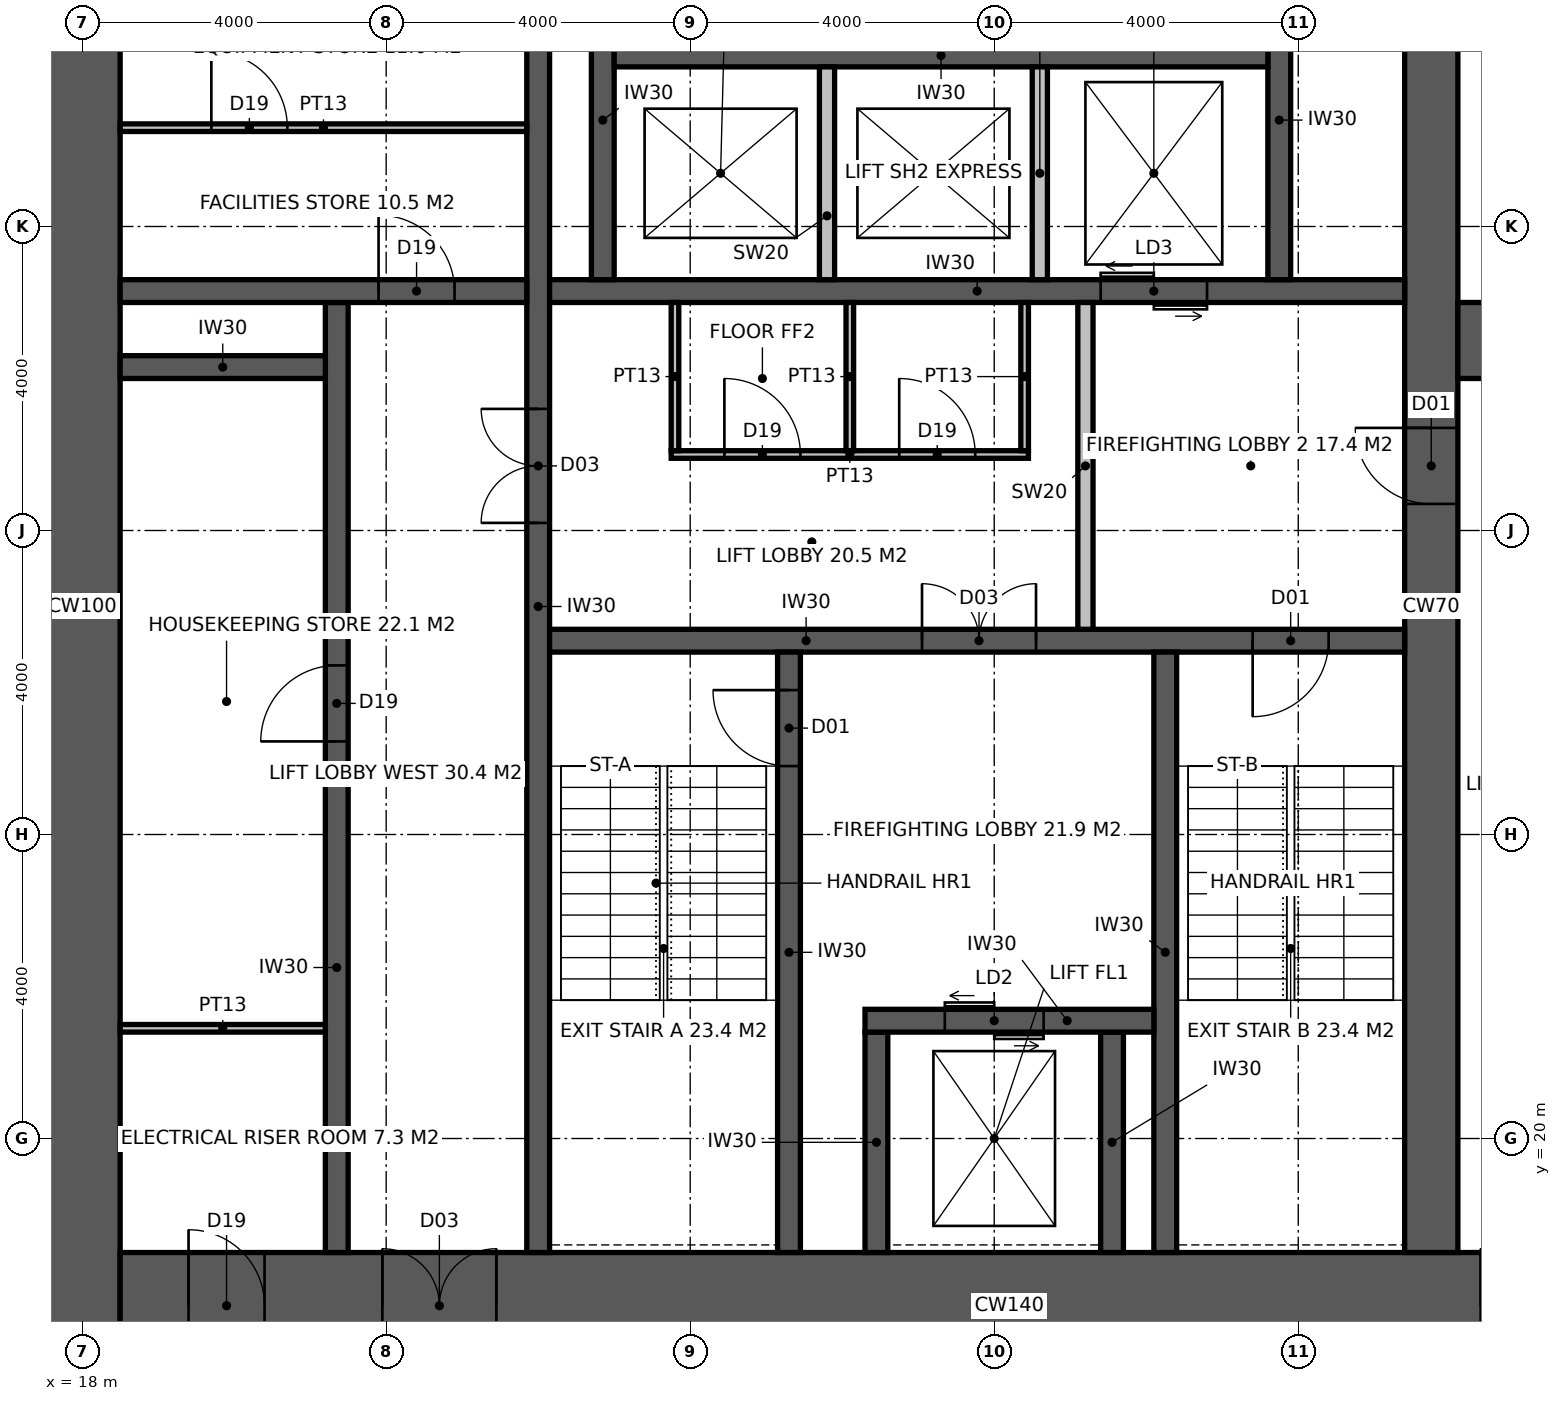
"""IFC4 building model, lengths in metres.
Left out: names, types, materials, properties, quantities, classifications, styles, units other than length and angle.
Written with IfcOpenShell. Run it as: python <this file> out.ifc"""

import sys

from ifc_helpers import new_model, si_unit, direction, frame, frame_2d, origin, place, context, subcontext, project, spatial, rectangle, extrude, element, fill, save


model = new_model("IFC4")
c1 = context("Model", 3, precision=1e-05, world=origin(), true_north=direction((0.0, 1.0)))
c2 = subcontext(c1, "Body", "Model", "MODEL_VIEW")
j1 = project(units=[si_unit("LENGTHUNIT", "METRE"), si_unit("PLANEANGLEUNIT", "RADIAN")], contexts=[c1])
p1 = place(None, origin())
s1 = spatial("IfcSite", under=j1, at=p1, CompositionType="ELEMENT")
p2 = place(p1, origin())
s2 = spatial("IfcBuilding", under=s1, at=p2, CompositionType="ELEMENT")
p3 = place(p2, frame((0.0, 0.0, 47.0)))
s3 = spatial("IfcBuildingStorey", under=s2, at=p3, CompositionType="ELEMENT", Elevation=47.0)
p4 = place(p3, frame((18.0, 17.1, -0.15), z_axis=(0.0, 0.0, 1.0), x_axis=(0.0, 1.0, 0.0)))
e1 = element("IfcWall", 1, at=p4, inside=s3, PredefinedType="SHEAR", context=c2, shape_type="SweptSolid", body=[
    extrude(rectangle(XDim=19.8, YDim=1.0, at=frame_2d((9.9, 0.0))), origin(), (0.0, 0.0, 1.0), 4.0),
])
p5 = place(p3, frame((18.5, 17.8, -0.15), z_axis=(0.0, 0.0, 1.0), x_axis=(1.0, 0.0, 0.0)))
e2 = element("IfcWall", 2, at=p5, inside=s3, PredefinedType="SHEAR", context=c2, shape_type="SweptSolid", body=[
    extrude(rectangle(XDim=23.4, YDim=1.4, at=frame_2d((11.7, 0.0))), origin(), (0.0, 0.0, 1.0), 4.0),
])
p6 = place(p5, frame((3.45, 0.0, 0.15)))
e3 = element("IfcOpeningElement", 3, at=p6, cuts=e2, PredefinedType="OPENING", context=c2, shape_type="SweptSolid", body=[
    extrude(rectangle(XDim=1.5, YDim=2.4, at=frame_2d((0.75, 1.2))), frame((0.0, 0.71, 0.0), z_axis=(0.0, -1.0, 0.0), x_axis=(1.0, 0.0, 0.0)), (0.0, 0.0, 1.0), 1.42),
])
p7 = place(p5, frame((17.9, 0.0, 0.15)))
e4 = element("IfcOpeningElement", 4, at=p7, cuts=e2, PredefinedType="OPENING", context=c2, shape_type="SweptSolid", body=[
    extrude(rectangle(XDim=1.5, YDim=2.4, at=frame_2d((0.75, 1.2))), frame((0.0, 0.71, 0.0), z_axis=(0.0, -1.0, 0.0), x_axis=(1.0, 0.0, 0.0)), (0.0, 0.0, 1.0), 1.42),
])
p8 = place(p5, frame((0.9, 0.0, 0.15)))
e5 = element("IfcOpeningElement", 5, at=p8, cuts=e2, PredefinedType="OPENING", context=c2, shape_type="SweptSolid", body=[
    extrude(rectangle(XDim=1.0, YDim=2.2, at=frame_2d((0.5, 1.1))), frame((0.0, 0.71, 0.0), z_axis=(0.0, -1.0, 0.0), x_axis=(1.0, 0.0, 0.0)), (0.0, 0.0, 1.0), 1.42),
])
p9 = place(p3, frame((35.75, 18.5, -0.15), z_axis=(0.0, 0.0, 1.0), x_axis=(0.0, 1.0, 0.0)))
e6 = element("IfcWall", 6, at=p9, inside=s3, PredefinedType="SHEAR", context=c2, shape_type="SweptSolid", body=[
    extrude(rectangle(XDim=17.0, YDim=0.7, at=frame_2d((8.5, 0.0))), origin(), (0.0, 0.0, 1.0), 4.0),
])
p10 = place(p9, frame((9.85, 0.0, 0.15)))
e7 = element("IfcOpeningElement", 7, at=p10, cuts=e6, PredefinedType="OPENING", context=c2, shape_type="SweptSolid", body=[
    extrude(rectangle(XDim=1.0, YDim=2.2, at=frame_2d((0.5, 1.1))), frame((0.0, 0.36, 0.0), z_axis=(0.0, -1.0, 0.0), x_axis=(1.0, 0.0, 0.0)), (0.0, 0.0, 1.0), 0.72),
])
p11 = place(p3, frame((24.0, 18.5, -0.15), z_axis=(0.0, 0.0, 1.0), x_axis=(0.0, 1.0, 0.0)))
e8 = element("IfcWall", 8, at=p11, inside=s3, PredefinedType="SHEAR", context=c2, shape_type="SweptSolid", body=[
    extrude(rectangle(XDim=17.0, YDim=0.3, at=frame_2d((8.5, 0.0))), origin(), (0.0, 0.0, 1.0), 4.0),
])
p12 = place(p11, frame((9.6, 0.0, 0.15)))
e9 = element("IfcOpeningElement", 9, at=p12, cuts=e8, PredefinedType="OPENING", context=c2, shape_type="SweptSolid", body=[
    extrude(rectangle(XDim=1.5, YDim=2.4, at=frame_2d((0.75, 1.2))), frame((0.0, 0.16, 0.0), z_axis=(0.0, -1.0, 0.0), x_axis=(1.0, 0.0, 0.0)), (0.0, 0.0, 1.0), 0.32),
])
p13 = place(p3, frame((24.15, 26.55, -0.15), z_axis=(0.0, 0.0, 1.0), x_axis=(1.0, 0.0, 0.0)))
e10 = element("IfcWall", 10, at=p13, inside=s3, PredefinedType="SHEAR", context=c2, shape_type="SweptSolid", body=[
    extrude(rectangle(XDim=11.25, YDim=0.3, at=frame_2d((5.625, 0.0))), origin(), (0.0, 0.0, 1.0), 4.0),
])
p14 = place(p13, frame((9.25, 0.0, 0.15)))
e11 = element("IfcOpeningElement", 11, at=p14, cuts=e10, PredefinedType="OPENING", context=c2, shape_type="SweptSolid", body=[
    extrude(rectangle(XDim=1.0, YDim=2.2, at=frame_2d((0.5, 1.1))), frame((0.0, 0.16, 0.0), z_axis=(0.0, -1.0, 0.0), x_axis=(1.0, 0.0, 0.0)), (0.0, 0.0, 1.0), 0.32),
])
p15 = place(p13, frame((4.9, 0.0, 0.15)))
e12 = element("IfcOpeningElement", 12, at=p15, cuts=e10, PredefinedType="OPENING", context=c2, shape_type="SweptSolid", body=[
    extrude(rectangle(XDim=1.5, YDim=2.4, at=frame_2d((0.75, 1.2))), frame((0.0, 0.16, 0.0), z_axis=(0.0, -1.0, 0.0), x_axis=(1.0, 0.0, 0.0)), (0.0, 0.0, 1.0), 0.32),
])
p16 = place(p3, frame((27.3, 18.5, -0.15), z_axis=(0.0, 0.0, 1.0), x_axis=(0.0, 1.0, 0.0)))
e13 = element("IfcWall", 13, at=p16, inside=s3, PredefinedType="SHEAR", context=c2, shape_type="SweptSolid", body=[
    extrude(rectangle(XDim=7.9, YDim=0.3, at=frame_2d((3.95, 0.0))), origin(), (0.0, 0.0, 1.0), 4.0),
])
p17 = place(p16, frame((6.4, 0.0, 0.15)))
e14 = element("IfcOpeningElement", 14, at=p17, cuts=e13, PredefinedType="OPENING", context=c2, shape_type="SweptSolid", body=[
    extrude(rectangle(XDim=1.0, YDim=2.2, at=frame_2d((0.5, 1.1))), frame((0.0, 0.16, 0.0), z_axis=(0.0, -1.0, 0.0), x_axis=(1.0, 0.0, 0.0)), (0.0, 0.0, 1.0), 0.32),
])
p18 = place(p3, frame((32.25, 18.5, -0.15), z_axis=(0.0, 0.0, 1.0), x_axis=(0.0, 1.0, 0.0)))
e15 = element("IfcWall", 15, at=p18, inside=s3, PredefinedType="SHEAR", context=c2, shape_type="SweptSolid", body=[
    extrude(rectangle(XDim=7.9, YDim=0.3, at=frame_2d((3.95, 0.0))), origin(), (0.0, 0.0, 1.0), 4.0),
])
for number, where, z_axis, x_axis in (
    (16, (28.45, 18.5, -0.15), (0.0, 0.0, 1.0), (0.0, 1.0, 0.0)),
    (17, (31.55, 18.5, -0.15), (0.0, 0.0, 1.0), (0.0, 1.0, 0.0)),
):
    element("IfcWall", number, at=place(p3, frame(where, z_axis=z_axis, x_axis=x_axis)), inside=s3, PredefinedType="SHEAR", context=c2, shape_type="SweptSolid", body=[
        extrude(rectangle(XDim=2.9, YDim=0.3, at=frame_2d((1.45, 0.0))), origin(), (0.0, 0.0, 1.0), 4.0),
    ])
p19 = place(p3, frame((28.3, 21.55, -0.15), z_axis=(0.0, 0.0, 1.0), x_axis=(1.0, 0.0, 0.0)))
e18 = element("IfcWall", 18, at=p19, inside=s3, PredefinedType="SHEAR", context=c2, shape_type="SweptSolid", body=[
    extrude(rectangle(XDim=3.8, YDim=0.3, at=frame_2d((1.9, 0.0))), origin(), (0.0, 0.0, 1.0), 4.0),
])
p20 = place(p19, frame((1.05, 0.0, 0.15)))
e19 = element("IfcOpeningElement", 19, at=p20, cuts=e18, PredefinedType="OPENING", context=c2, shape_type="SweptSolid", body=[
    extrude(rectangle(XDim=1.3, YDim=2.4, at=frame_2d((0.65, 1.2))), frame((0.0, 0.16, 0.0), z_axis=(0.0, -1.0, 0.0), x_axis=(1.0, 0.0, 0.0)), (0.0, 0.0, 1.0), 0.32),
])
p21 = place(p3, frame((24.15, 31.15, -0.15), z_axis=(0.0, 0.0, 1.0), x_axis=(1.0, 0.0, 0.0)))
e20 = element("IfcWall", 20, at=p21, inside=s3, PredefinedType="SHEAR", context=c2, shape_type="SweptSolid", body=[
    extrude(rectangle(XDim=11.25, YDim=0.3, at=frame_2d((5.625, 0.0))), origin(), (0.0, 0.0, 1.0), 4.0),
])
p22 = place(p21, frame((7.25, 0.0, 0.15)))
e21 = element("IfcOpeningElement", 21, at=p22, cuts=e20, PredefinedType="OPENING", context=c2, shape_type="SweptSolid", body=[
    extrude(rectangle(XDim=1.4, YDim=2.4, at=frame_2d((0.7, 1.2))), frame((0.0, 0.16, 0.0), z_axis=(0.0, -1.0, 0.0), x_axis=(1.0, 0.0, 0.0)), (0.0, 0.0, 1.0), 0.32),
])
p23 = place(p3, frame((21.35, 18.5, -0.15), z_axis=(0.0, 0.0, 1.0), x_axis=(0.0, 1.0, 0.0)))
e22 = element("IfcWall", 22, at=p23, inside=s3, PredefinedType="SHEAR", context=c2, shape_type="SweptSolid", body=[
    extrude(rectangle(XDim=12.5, YDim=0.3, at=frame_2d((6.25, 0.0))), origin(), (0.0, 0.0, 1.0), 4.0),
])
p24 = place(p23, frame((6.725, 0.0, 0.15)))
e23 = element("IfcOpeningElement", 23, at=p24, cuts=e22, PredefinedType="OPENING", context=c2, shape_type="SweptSolid", body=[
    extrude(rectangle(XDim=1.0, YDim=2.2, at=frame_2d((0.5, 1.1))), frame((0.0, 0.16, 0.0), z_axis=(0.0, -1.0, 0.0), x_axis=(1.0, 0.0, 0.0)), (0.0, 0.0, 1.0), 0.32),
])
p25 = place(p3, frame((18.5, 31.15, -0.15), z_axis=(0.0, 0.0, 1.0), x_axis=(1.0, 0.0, 0.0)))
e24 = element("IfcWall", 24, at=p25, inside=s3, PredefinedType="SHEAR", context=c2, shape_type="SweptSolid", body=[
    extrude(rectangle(XDim=5.35, YDim=0.3, at=frame_2d((2.675, 0.0))), origin(), (0.0, 0.0, 1.0), 4.0),
])
p26 = place(p25, frame((3.4, 0.0, 0.15)))
e25 = element("IfcOpeningElement", 25, at=p26, cuts=e24, PredefinedType="OPENING", context=c2, shape_type="SweptSolid", body=[
    extrude(rectangle(XDim=1.0, YDim=2.2, at=frame_2d((0.5, 1.1))), frame((0.0, 0.16, 0.0), z_axis=(0.0, -1.0, 0.0), x_axis=(1.0, 0.0, 0.0)), (0.0, 0.0, 1.0), 0.32),
])
p27 = place(p3, frame((18.5, 30.15, -0.15), z_axis=(0.0, 0.0, 1.0), x_axis=(1.0, 0.0, 0.0)))
e26 = element("IfcWall", 26, at=p27, inside=s3, PredefinedType="SHEAR", context=c2, shape_type="SweptSolid", body=[
    extrude(rectangle(XDim=2.7, YDim=0.3, at=frame_2d((1.35, 0.0))), origin(), (0.0, 0.0, 1.0), 4.0),
])
for number, where, z_axis, x_axis in (
    (27, (24.85, 31.3, -0.15), (0.0, 0.0, 1.0), (0.0, 1.0, 0.0)),
    (28, (33.75, 31.3, -0.15), (0.0, 0.0, 1.0), (0.0, 1.0, 0.0)),
):
    element("IfcWall", number, at=place(p3, frame(where, z_axis=z_axis, x_axis=x_axis)), inside=s3, PredefinedType="SHEAR", context=c2, shape_type="SweptSolid", body=[
        extrude(rectangle(XDim=4.2, YDim=0.3, at=frame_2d((2.1, 0.0))), origin(), (0.0, 0.0, 1.0), 4.0),
    ])
p28 = place(p3, frame((25.0, 34.25, -0.15), z_axis=(0.0, 0.0, 1.0), x_axis=(1.0, 0.0, 0.0)))
e29 = element("IfcWall", 29, at=p28, inside=s3, PredefinedType="SHEAR", context=c2, shape_type="SweptSolid", body=[
    extrude(rectangle(XDim=8.6, YDim=0.3, at=frame_2d((4.3, 0.0))), origin(), (0.0, 0.0, 1.0), 4.0),
])
for number, where, z_axis, x_axis in (
    (30, (27.8, 31.3, -0.15), (0.0, 0.0, 1.0), (0.0, 1.0, 0.0)),
    (31, (30.6, 31.3, -0.15), (0.0, 0.0, 1.0), (0.0, 1.0, 0.0)),
):
    element("IfcWall", number, at=place(p3, frame(where, z_axis=z_axis, x_axis=x_axis)), inside=s3, PredefinedType="SOLIDWALL", context=c2, shape_type="SweptSolid", body=[
        extrude(rectangle(XDim=2.8, YDim=0.2, at=frame_2d((1.4, 0.0))), origin(), (0.0, 0.0, 1.0), 4.0),
    ])
p29 = place(p3, frame((36.1, 30.5, -0.15), z_axis=(0.0, 0.0, 1.0), x_axis=(1.0, 0.0, 0.0)))
e32 = element("IfcWall", 32, at=p29, inside=s3, PredefinedType="SHEAR", context=c2, shape_type="SweptSolid", body=[
    extrude(rectangle(XDim=5.8, YDim=1.0, at=frame_2d((2.9, 0.0))), origin(), (0.0, 0.0, 1.0), 4.0),
])
p30 = place(p29, frame((0.6, 0.0, 0.15)))
e33 = element("IfcOpeningElement", 33, at=p30, cuts=e32, PredefinedType="OPENING", context=c2, shape_type="SweptSolid", body=[
    extrude(rectangle(XDim=1.0, YDim=2.2, at=frame_2d((0.5, 1.1))), frame((0.0, 0.51, 0.0), z_axis=(0.0, -1.0, 0.0), x_axis=(1.0, 0.0, 0.0)), (0.0, 0.0, 1.0), 1.02),
])
p31 = place(p3, frame((31.2, 26.7, 0.0), z_axis=(0.0, 0.0, 1.0), x_axis=(0.0, 1.0, 0.0)))
e34 = element("IfcWall", 34, at=p31, inside=s3, PredefinedType="SOLIDWALL", context=c2, shape_type="SweptSolid", body=[
    extrude(rectangle(XDim=4.3, YDim=0.2, at=frame_2d((2.15, 0.0))), origin(), (0.0, 0.0, 1.0), 3.85),
])
p32 = place(p3, frame((18.5, 33.3, 0.0), z_axis=(0.0, 0.0, 1.0), x_axis=(1.0, 0.0, 0.0)))
e35 = element("IfcWall", 35, at=p32, inside=s3, PredefinedType="PARTITIONING", context=c2, shape_type="SweptSolid", body=[
    extrude(rectangle(XDim=5.35, YDim=0.1, at=frame_2d((2.675, 0.0))), origin(), (0.0, 0.0, 1.0), 3.85),
])
p33 = place(p32, frame((1.2, 0.0, 0.0)))
e36 = element("IfcOpeningElement", 36, at=p33, cuts=e35, PredefinedType="OPENING", context=c2, shape_type="SweptSolid", body=[
    extrude(rectangle(XDim=1.0, YDim=2.2, at=frame_2d((0.5, 1.1))), frame((0.0, 0.06, 0.0), z_axis=(0.0, -1.0, 0.0), x_axis=(1.0, 0.0, 0.0)), (0.0, 0.0, 1.0), 0.12),
])
p34 = place(p3, frame((25.75, 29.0, 0.0), z_axis=(0.0, 0.0, 1.0), x_axis=(1.0, 0.0, 0.0)))
e37 = element("IfcWall", 37, at=p34, inside=s3, PredefinedType="PARTITIONING", context=c2, shape_type="SweptSolid", body=[
    extrude(rectangle(XDim=4.7, YDim=0.1, at=frame_2d((2.35, 0.0))), origin(), (0.0, 0.0, 1.0), 3.85),
])
p35 = place(p34, frame((0.7, 0.0, 0.0)))
e38 = element("IfcOpeningElement", 38, at=p35, cuts=e37, PredefinedType="OPENING", context=c2, shape_type="SweptSolid", body=[
    extrude(rectangle(XDim=1.0, YDim=2.2, at=frame_2d((0.5, 1.1))), frame((0.0, 0.06, 0.0), z_axis=(0.0, -1.0, 0.0), x_axis=(1.0, 0.0, 0.0)), (0.0, 0.0, 1.0), 0.12),
])
p36 = place(p34, frame((3.0, 0.0, 0.0)))
e39 = element("IfcOpeningElement", 39, at=p36, cuts=e37, PredefinedType="OPENING", context=c2, shape_type="SweptSolid", body=[
    extrude(rectangle(XDim=1.0, YDim=2.2, at=frame_2d((0.5, 1.1))), frame((0.0, 0.06, 0.0), z_axis=(0.0, -1.0, 0.0), x_axis=(1.0, 0.0, 0.0)), (0.0, 0.0, 1.0), 0.12),
])
for number, where, z_axis, x_axis in (
    (40, (25.8, 29.05, 0.0), (0.0, 0.0, 1.0), (0.0, 1.0, 0.0)),
    (41, (30.4, 29.05, 0.0), (0.0, 0.0, 1.0), (0.0, 1.0, 0.0)),
    (42, (28.1, 29.05, 0.0), (0.0, 0.0, 1.0), (0.0, 1.0, 0.0)),
):
    element("IfcWall", number, at=place(p3, frame(where, z_axis=z_axis, x_axis=x_axis)), inside=s3, PredefinedType="PARTITIONING", context=c2, shape_type="SweptSolid", body=[
        extrude(rectangle(XDim=1.95, YDim=0.1, at=frame_2d((0.975, 0.0))), origin(), (0.0, 0.0, 1.0), 3.85),
    ])
p37 = place(p3, frame((18.5, 21.45, 0.0), z_axis=(0.0, 0.0, 1.0), x_axis=(1.0, 0.0, 0.0)))
e43 = element("IfcWall", 43, at=p37, inside=s3, PredefinedType="PARTITIONING", context=c2, shape_type="SweptSolid", body=[
    extrude(rectangle(XDim=2.7, YDim=0.1, at=frame_2d((1.35, 0.0))), origin(), (0.0, 0.0, 1.0), 3.85),
])
p38 = place(p17, origin())
e44 = element("IfcDoor", 44, at=p38, inside=s3, OperationType="SINGLE_SWING_RIGHT", PredefinedType="DOOR", context=c2, shape_type="SweptSolid", body=[
    extrude(rectangle(XDim=1.0, YDim=2.2, at=frame_2d((0.5, 1.1))), frame((0.0, 0.025, 0.0), z_axis=(0.0, -1.0, 0.0), x_axis=(1.0, 0.0, 0.0)), (0.0, 0.0, 1.0), 0.05),
])
fill(e14, e44)
p39 = place(p14, frame((1.0, 0.0, 0.0), z_axis=(0.0, 0.0, 1.0), x_axis=(-1.0, 0.0, 0.0)))
e45 = element("IfcDoor", 45, at=p39, inside=s3, OperationType="SINGLE_SWING_RIGHT", PredefinedType="DOOR", context=c2, shape_type="SweptSolid", body=[
    extrude(rectangle(XDim=1.0, YDim=2.2, at=frame_2d((0.5, 1.1))), frame((0.0, 0.025, 0.0), z_axis=(0.0, -1.0, 0.0), x_axis=(1.0, 0.0, 0.0)), (0.0, 0.0, 1.0), 0.05),
])
fill(e11, e45)
p40 = place(p10, origin())
e46 = element("IfcDoor", 46, at=p40, inside=s3, OperationType="SINGLE_SWING_RIGHT", PredefinedType="DOOR", context=c2, shape_type="SweptSolid", body=[
    extrude(rectangle(XDim=1.0, YDim=2.2, at=frame_2d((0.5, 1.1))), frame((0.0, 0.025, 0.0), z_axis=(0.0, -1.0, 0.0), x_axis=(1.0, 0.0, 0.0)), (0.0, 0.0, 1.0), 0.05),
])
fill(e7, e46)
p41 = place(p15, origin())
e47 = element("IfcDoor", 47, at=p41, inside=s3, OperationType="DOUBLE_DOOR_DOUBLE_SWING", PredefinedType="DOOR", context=c2, shape_type="SweptSolid", body=[
    extrude(rectangle(XDim=1.5, YDim=2.4, at=frame_2d((0.75, 1.2))), frame((0.0, 0.025, 0.0), z_axis=(0.0, -1.0, 0.0), x_axis=(1.0, 0.0, 0.0)), (0.0, 0.0, 1.0), 0.05),
])
fill(e12, e47)
p42 = place(p12, origin())
e48 = element("IfcDoor", 48, at=p42, inside=s3, OperationType="DOUBLE_DOOR_DOUBLE_SWING", PredefinedType="DOOR", context=c2, shape_type="SweptSolid", body=[
    extrude(rectangle(XDim=1.5, YDim=2.4, at=frame_2d((0.75, 1.2))), frame((0.0, 0.025, 0.0), z_axis=(0.0, -1.0, 0.0), x_axis=(1.0, 0.0, 0.0)), (0.0, 0.0, 1.0), 0.05),
])
fill(e9, e48)
p43 = place(p26, origin())
e49 = element("IfcDoor", 49, at=p43, inside=s3, OperationType="SINGLE_SWING_LEFT", PredefinedType="DOOR", context=c2, shape_type="SweptSolid", body=[
    extrude(rectangle(XDim=1.0, YDim=2.2, at=frame_2d((0.5, 1.1))), frame((0.0, 0.025, 0.0), z_axis=(0.0, -1.0, 0.0), x_axis=(1.0, 0.0, 0.0)), (0.0, 0.0, 1.0), 0.05),
])
fill(e25, e49)
p44 = place(p33, origin())
e50 = element("IfcDoor", 50, at=p44, inside=s3, OperationType="SINGLE_SWING_LEFT", PredefinedType="DOOR", context=c2, shape_type="SweptSolid", body=[
    extrude(rectangle(XDim=1.0, YDim=2.2, at=frame_2d((0.5, 1.1))), frame((0.0, 0.025, 0.0), z_axis=(0.0, -1.0, 0.0), x_axis=(1.0, 0.0, 0.0)), (0.0, 0.0, 1.0), 0.05),
])
fill(e36, e50)
p45 = place(p35, origin())
e51 = element("IfcDoor", 51, at=p45, inside=s3, OperationType="SINGLE_SWING_LEFT", PredefinedType="DOOR", context=c2, shape_type="SweptSolid", body=[
    extrude(rectangle(XDim=1.0, YDim=2.2, at=frame_2d((0.5, 1.1))), frame((0.0, 0.025, 0.0), z_axis=(0.0, -1.0, 0.0), x_axis=(1.0, 0.0, 0.0)), (0.0, 0.0, 1.0), 0.05),
])
fill(e38, e51)
p46 = place(p36, origin())
e52 = element("IfcDoor", 52, at=p46, inside=s3, OperationType="SINGLE_SWING_LEFT", PredefinedType="DOOR", context=c2, shape_type="SweptSolid", body=[
    extrude(rectangle(XDim=1.0, YDim=2.2, at=frame_2d((0.5, 1.1))), frame((0.0, 0.025, 0.0), z_axis=(0.0, -1.0, 0.0), x_axis=(1.0, 0.0, 0.0)), (0.0, 0.0, 1.0), 0.05),
])
fill(e39, e52)
p47 = place(p24, origin())
e53 = element("IfcDoor", 53, at=p47, inside=s3, OperationType="SINGLE_SWING_LEFT", PredefinedType="DOOR", context=c2, shape_type="SweptSolid", body=[
    extrude(rectangle(XDim=1.0, YDim=2.2, at=frame_2d((0.5, 1.1))), frame((0.0, 0.025, 0.0), z_axis=(0.0, -1.0, 0.0), x_axis=(1.0, 0.0, 0.0)), (0.0, 0.0, 1.0), 0.05),
])
fill(e23, e53)
p48 = place(p6, origin())
e54 = element("IfcDoor", 54, at=p48, inside=s3, OperationType="DOUBLE_DOOR_DOUBLE_SWING", PredefinedType="DOOR", context=c2, shape_type="SweptSolid", body=[
    extrude(rectangle(XDim=1.5, YDim=2.4, at=frame_2d((0.75, 1.2))), frame((0.0, 0.025, 0.0), z_axis=(0.0, -1.0, 0.0), x_axis=(1.0, 0.0, 0.0)), (0.0, 0.0, 1.0), 0.05),
])
fill(e3, e54)
p49 = place(p8, origin())
e55 = element("IfcDoor", 55, at=p49, inside=s3, OperationType="SINGLE_SWING_LEFT", PredefinedType="DOOR", context=c2, shape_type="SweptSolid", body=[
    extrude(rectangle(XDim=1.0, YDim=2.2, at=frame_2d((0.5, 1.1))), frame((0.0, 0.025, 0.0), z_axis=(0.0, -1.0, 0.0), x_axis=(1.0, 0.0, 0.0)), (0.0, 0.0, 1.0), 0.05),
])
fill(e5, e55)
p50 = place(p20, origin())
e56 = element("IfcDoor", 56, at=p50, inside=s3, OperationType="DOUBLE_DOOR_SLIDING", PredefinedType="DOOR", context=c2, shape_type="SweptSolid", body=[
    extrude(rectangle(XDim=1.3, YDim=2.4, at=frame_2d((0.65, 1.2))), frame((0.0, 0.025, 0.0), z_axis=(0.0, -1.0, 0.0), x_axis=(1.0, 0.0, 0.0)), (0.0, 0.0, 1.0), 0.05),
])
fill(e19, e56)
p51 = place(p22, origin())
e57 = element("IfcDoor", 57, at=p51, inside=s3, OperationType="DOUBLE_DOOR_SLIDING", PredefinedType="DOOR", context=c2, shape_type="SweptSolid", body=[
    extrude(rectangle(XDim=1.4, YDim=2.4, at=frame_2d((0.7, 1.2))), frame((0.0, 0.025, 0.0), z_axis=(0.0, -1.0, 0.0), x_axis=(1.0, 0.0, 0.0)), (0.0, 0.0, 1.0), 0.05),
])
fill(e21, e57)
save(model, sys.argv[1])
